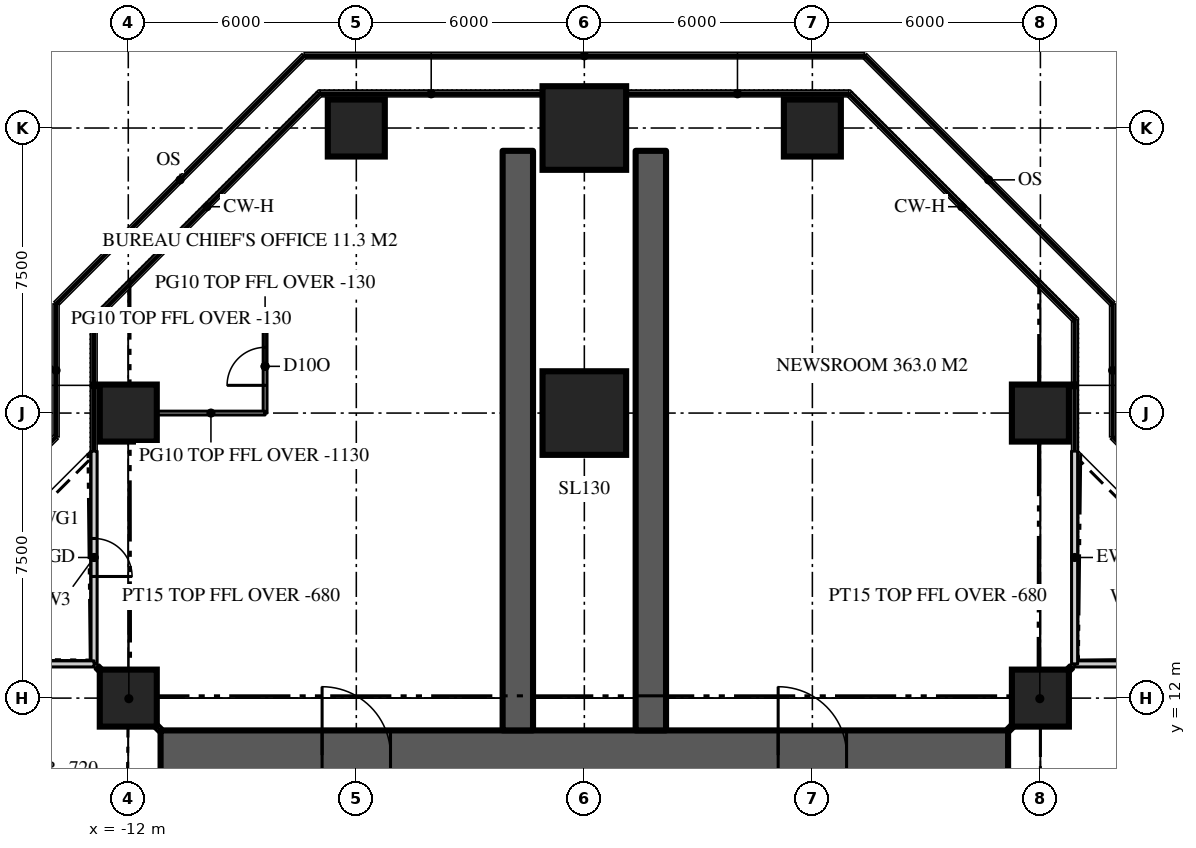
"""IFC4 building model, lengths in metres.
Left out: names, types, materials, properties, quantities, classifications, styles, units other than length and angle.
Written with IfcOpenShell. Run it as: python <this file> out.ifc"""

import sys

from ifc_helpers import new_model, si_unit, direction, frame, frame_2d, origin, origin_2d, place, context, subcontext, project, spatial, rectangle, extrude, element, fill, save


model = new_model("IFC4")
c1 = context("Model", 3, precision=1e-05, world=origin(), true_north=direction((0.0, 1.0)))
c2 = subcontext(c1, "Body", "Model", "MODEL_VIEW")
j1 = project(units=[si_unit("LENGTHUNIT", "METRE"), si_unit("PLANEANGLEUNIT", "RADIAN")], contexts=[c1])
p1 = place(None, origin())
s1 = spatial("IfcSite", under=j1, at=p1, CompositionType="ELEMENT")
p2 = place(p1, origin())
s2 = spatial("IfcBuilding", under=s1, at=p2, CompositionType="ELEMENT")
p3 = place(p2, frame((0.0, 0.0, 247.8)))
s3 = spatial("IfcBuildingStorey", under=s2, at=p3, CompositionType="ELEMENT", Elevation=247.8)
p4 = place(p3, frame((-11.15, 10.5, 0.0), z_axis=(0.0, 0.0, 1.0), x_axis=(1.0, 0.0, 0.0)))
e1 = element("IfcWall", 1, at=p4, inside=s3, PredefinedType="SHEAR", context=c2, shape_type="SweptSolid", body=[
    extrude(rectangle(XDim=22.3, YDim=1.3, at=frame_2d((11.15, 0.0))), origin(), (0.0, 0.0, 1.0), 3.9),
])
p5 = place(p4, frame((4.25, 0.0, 0.0)))
e2 = element("IfcOpeningElement", 2, at=p5, cuts=e1, PredefinedType="OPENING", context=c2, shape_type="SweptSolid", body=[
    extrude(rectangle(XDim=1.8, YDim=2.2, at=frame_2d((0.9, 1.1))), frame((0.0, 0.66, 0.0), z_axis=(0.0, -1.0, 0.0), x_axis=(1.0, 0.0, 0.0)), (0.0, 0.0, 1.0), 1.32),
])
p6 = place(p4, frame((16.25, 0.0, 0.0)))
e3 = element("IfcOpeningElement", 3, at=p6, cuts=e1, PredefinedType="OPENING", context=c2, shape_type="SweptSolid", body=[
    extrude(rectangle(XDim=1.8, YDim=2.2, at=frame_2d((0.9, 1.1))), frame((0.0, 0.66, 0.0), z_axis=(0.0, -1.0, 0.0), x_axis=(1.0, 0.0, 0.0)), (0.0, 0.0, 1.0), 1.32),
])
for number, where, z_axis, x_axis in (
    (4, (1.75, 11.15, 0.0), (0.0, 0.0, 1.0), (0.0, 1.0, 0.0)),
    (5, (-1.75, 11.15, 0.0), (0.0, 0.0, 1.0), (0.0, 1.0, 0.0)),
):
    element("IfcWall", number, at=place(p3, frame(where, z_axis=z_axis, x_axis=x_axis)), inside=s3, PredefinedType="SHEAR", context=c2, shape_type="SweptSolid", body=[
        extrude(rectangle(XDim=15.25, YDim=0.8, at=frame_2d((7.625, 0.0))), origin(), (0.0, 0.0, 1.0), 3.9),
    ])
for number, where, z_axis, x_axis in (
    (6, (-12.0, 12.0, 0.0), (0.0, 0.0, 1.0), (1.0, 0.0, 0.0)),
    (7, (12.0, 12.0, 0.0), (0.0, 0.0, 1.0), (1.0, 0.0, 0.0)),
    (8, (-12.0, 19.5, 0.0), (0.0, 0.0, 1.0), (1.0, 0.0, 0.0)),
):
    element("IfcColumn", number, at=place(p3, frame(where, z_axis=z_axis, x_axis=x_axis)), inside=s3, PredefinedType="COLUMN", context=c2, shape_type="SweptSolid", body=[
        extrude(rectangle(XDim=1.5, YDim=1.5, at=origin_2d()), origin(), (0.0, 0.0, 1.0), 3.9),
    ])
p7 = place(p3, frame((0.0, 19.5, 0.0), z_axis=(0.0, 0.0, 1.0), x_axis=(1.0, 0.0, 0.0)))
e9 = element("IfcColumn", 9, at=p7, inside=s3, PredefinedType="COLUMN", context=c2, shape_type="SweptSolid", body=[
    extrude(rectangle(XDim=2.2, YDim=2.2, at=origin_2d()), origin(), (0.0, 0.0, 1.0), 3.9),
])
for number, where, z_axis, x_axis in (
    (10, (12.0, 19.5, 0.0), (0.0, 0.0, 1.0), (1.0, 0.0, 0.0)),
    (11, (-6.0, 27.0, 0.0), (0.0, 0.0, 1.0), (1.0, 0.0, 0.0)),
):
    element("IfcColumn", number, at=place(p3, frame(where, z_axis=z_axis, x_axis=x_axis)), inside=s3, PredefinedType="COLUMN", context=c2, shape_type="SweptSolid", body=[
        extrude(rectangle(XDim=1.5, YDim=1.5, at=origin_2d()), origin(), (0.0, 0.0, 1.0), 3.9),
    ])
p8 = place(p3, frame((0.0, 27.0, 0.0), z_axis=(0.0, 0.0, 1.0), x_axis=(1.0, 0.0, 0.0)))
e12 = element("IfcColumn", 12, at=p8, inside=s3, PredefinedType="COLUMN", context=c2, shape_type="SweptSolid", body=[
    extrude(rectangle(XDim=2.2, YDim=2.2, at=origin_2d()), origin(), (0.0, 0.0, 1.0), 3.9),
])
p9 = place(p3, frame((6.0, 27.0, 0.0), z_axis=(0.0, 0.0, 1.0), x_axis=(1.0, 0.0, 0.0)))
e13 = element("IfcColumn", 13, at=p9, inside=s3, PredefinedType="COLUMN", context=c2, shape_type="SweptSolid", body=[
    extrude(rectangle(XDim=1.5, YDim=1.5, at=origin_2d()), origin(), (0.0, 0.0, 1.0), 3.9),
])
p10 = place(p3, frame((18.5, 12.9, 0.0), z_axis=(0.0, 0.0, 1.0), x_axis=(-1.0, 0.0, 0.0)))
e14 = element("IfcWall", 14, at=p10, inside=s3, PredefinedType="SOLIDWALL", context=c2, shape_type="SweptSolid", body=[
    extrude(rectangle(XDim=5.6, YDim=0.16, at=frame_2d((2.8, 0.0))), origin(), (0.0, 0.0, 1.0), 3.77),
])
p11 = place(p10, frame((2.3, 0.0, 0.0)))
e15 = element("IfcOpeningElement", 15, at=p11, cuts=e14, PredefinedType="OPENING", context=c2, shape_type="SweptSolid", body=[
    extrude(rectangle(XDim=1.0, YDim=2.2, at=frame_2d((0.5, 1.1))), frame((0.0, 0.09, 0.0), z_axis=(0.0, -1.0, 0.0), x_axis=(1.0, 0.0, 0.0)), (0.0, 0.0, 1.0), 0.18),
])
p12 = place(p3, frame((12.9, 12.9, 0.0), z_axis=(0.0, 0.0, 1.0), x_axis=(0.0, 1.0, 0.0)))
e16 = element("IfcWall", 16, at=p12, inside=s3, PredefinedType="SOLIDWALL", context=c2, shape_type="SweptSolid", body=[
    extrude(rectangle(XDim=5.6, YDim=0.16, at=frame_2d((2.8, 0.0))), origin(), (0.0, 0.0, 1.0), 3.77),
])
p13 = place(p3, frame((-12.9, 18.5, 0.0), z_axis=(0.0, 0.0, 1.0), x_axis=(0.0, -1.0, 0.0)))
e17 = element("IfcWall", 17, at=p13, inside=s3, PredefinedType="SOLIDWALL", context=c2, shape_type="SweptSolid", body=[
    extrude(rectangle(XDim=5.6, YDim=0.16, at=frame_2d((2.8, 0.0))), origin(), (0.0, 0.0, 1.0), 3.77),
])
p14 = place(p13, frame((2.3, 0.0, 0.0)))
e18 = element("IfcOpeningElement", 18, at=p14, cuts=e17, PredefinedType="OPENING", context=c2, shape_type="SweptSolid", body=[
    extrude(rectangle(XDim=1.0, YDim=2.2, at=frame_2d((0.5, 1.1))), frame((0.0, 0.09, 0.0), z_axis=(0.0, -1.0, 0.0), x_axis=(1.0, 0.0, 0.0)), (0.0, 0.0, 1.0), 0.18),
])
p15 = place(p3, frame((-12.9, 12.9, 0.0), z_axis=(0.0, 0.0, 1.0), x_axis=(-1.0, 0.0, 0.0)))
e19 = element("IfcWall", 19, at=p15, inside=s3, PredefinedType="SOLIDWALL", context=c2, shape_type="SweptSolid", body=[
    extrude(rectangle(XDim=5.6, YDim=0.16, at=frame_2d((2.8, 0.0))), origin(), (0.0, 0.0, 1.0), 3.77),
])
p16 = place(p3, frame((-8.4, 19.5, 0.0), z_axis=(0.0, 0.0, 1.0), x_axis=(0.0, 1.0, 0.0)))
e20 = element("IfcWall", 20, at=p16, inside=s3, PredefinedType="PARTITIONING", context=c2, shape_type="SweptSolid", body=[
    extrude(rectangle(XDim=2.459, YDim=0.1, at=frame_2d((1.229, 0.0))), origin(), (0.0, 0.0, 1.0), 3.77),
])
p17 = place(p16, frame((0.729, 0.0, 0.0)))
e21 = element("IfcOpeningElement", 21, at=p17, cuts=e20, PredefinedType="OPENING", context=c2, shape_type="SweptSolid", body=[
    extrude(rectangle(XDim=1.0, YDim=2.2, at=frame_2d((0.5, 1.1))), frame((0.0, 0.06, 0.0), z_axis=(0.0, -1.0, 0.0), x_axis=(1.0, 0.0, 0.0)), (0.0, 0.0, 1.0), 0.12),
])
p18 = place(p3, frame((-8.4, 19.5, 0.0), z_axis=(0.0, 0.0, 1.0), x_axis=(-1.0, 0.0, 0.0)))
e22 = element("IfcWall", 22, at=p18, inside=s3, PredefinedType="PARTITIONING", context=c2, shape_type="SweptSolid", body=[
    extrude(rectangle(XDim=2.85, YDim=0.1, at=frame_2d((1.425, 0.0))), origin(), (0.0, 0.0, 1.0), 2.77),
])
p19 = place(p3, frame((-8.4, 21.959, 0.0), z_axis=(0.0, 0.0, 1.0), x_axis=(-1.0, 0.0, 0.0)))
e23 = element("IfcWall", 23, at=p19, inside=s3, PredefinedType="PARTITIONING", context=c2, shape_type="SweptSolid", body=[
    extrude(rectangle(XDim=4.42, YDim=0.1, at=frame_2d((2.21, 0.0))), origin(), (0.0, 0.0, 1.0), 3.77),
])
for number, where, z_axis, x_axis in (
    (24, (11.15, 11.15, 0.0), (0.0, 0.0, 1.0), (0.707, 0.707, 0.0)),
    (25, (-11.15, 11.15, 0.0), (0.0, 0.0, 1.0), (-0.707, 0.707, 0.0)),
):
    element("IfcWall", number, at=place(p3, frame(where, z_axis=z_axis, x_axis=x_axis)), inside=s3, PredefinedType="PARTITIONING", context=c2, shape_type="SweptSolid", body=[
        extrude(rectangle(XDim=2.362, YDim=0.15, at=frame_2d((1.181, 0.0))), origin(), (0.0, 0.0, 1.0), 3.22),
    ])
p20 = place(p14, origin())
e26 = element("IfcDoor", 26, at=p20, inside=s3, OperationType="SINGLE_SWING_RIGHT", PredefinedType="DOOR", context=c2, shape_type="SweptSolid", body=[
    extrude(rectangle(XDim=1.0, YDim=2.2, at=frame_2d((0.5, 1.1))), frame((0.0, 0.025, 0.0), z_axis=(0.0, -1.0, 0.0), x_axis=(1.0, 0.0, 0.0)), (0.0, 0.0, 1.0), 0.05),
])
fill(e18, e26)
p21 = place(p5, origin())
e27 = element("IfcDoor", 27, at=p21, inside=s3, OperationType="DOUBLE_DOOR_DOUBLE_SWING", PredefinedType="DOOR", context=c2, shape_type="SweptSolid", body=[
    extrude(rectangle(XDim=1.8, YDim=2.2, at=frame_2d((0.9, 1.1))), frame((0.0, 0.025, 0.0), z_axis=(0.0, -1.0, 0.0), x_axis=(1.0, 0.0, 0.0)), (0.0, 0.0, 1.0), 0.05),
])
fill(e2, e27)
p22 = place(p6, origin())
e28 = element("IfcDoor", 28, at=p22, inside=s3, OperationType="DOUBLE_DOOR_DOUBLE_SWING", PredefinedType="DOOR", context=c2, shape_type="SweptSolid", body=[
    extrude(rectangle(XDim=1.8, YDim=2.2, at=frame_2d((0.9, 1.1))), frame((0.0, 0.025, 0.0), z_axis=(0.0, -1.0, 0.0), x_axis=(1.0, 0.0, 0.0)), (0.0, 0.0, 1.0), 0.05),
])
fill(e3, e28)
p23 = place(p17, origin())
e29 = element("IfcDoor", 29, at=p23, inside=s3, OperationType="SINGLE_SWING_LEFT", PredefinedType="DOOR", context=c2, shape_type="SweptSolid", body=[
    extrude(rectangle(XDim=1.0, YDim=2.2, at=frame_2d((0.5, 1.1))), frame((0.0, 0.025, 0.0), z_axis=(0.0, -1.0, 0.0), x_axis=(1.0, 0.0, 0.0)), (0.0, 0.0, 1.0), 0.05),
])
fill(e21, e29)
save(model, sys.argv[1])
